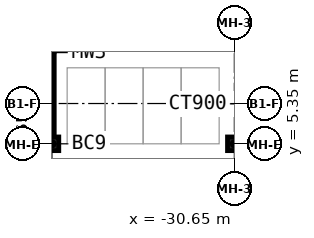
"""IFC4 building model, lengths in metres.
Left out: names, types, materials, properties, quantities, classifications, styles, units other than length and angle.
Written with IfcOpenShell. Run it as: python <this file> out.ifc"""

import sys

from ifc_helpers import new_model, si_unit, direction, frame, frame_2d, origin, origin_2d, place, context, subcontext, project, spatial, rectangle, extrude, source, transform, mapped, element, save


model = new_model("IFC4")
c1 = context("Model", 3, precision=1e-05, world=origin(), true_north=direction((0.0, 1.0)))
c2 = subcontext(c1, "Body", "Model", "MODEL_VIEW")
j1 = project(units=[si_unit("LENGTHUNIT", "METRE"), si_unit("PLANEANGLEUNIT", "RADIAN")], contexts=[c1])
p1 = place(None, origin())
s1 = spatial("IfcSite", under=j1, at=p1, CompositionType="ELEMENT")
p2 = place(p1, origin())
s2 = spatial("IfcBuilding", under=s1, at=p2, CompositionType="ELEMENT")
p3 = place(p2, frame((0.0, 0.0, -4.5)))
s3 = spatial("IfcBuildingStorey", under=s2, at=p3, CompositionType="ELEMENT", Elevation=-4.5)
m1 = source(origin(), c2, "Body", "SweptSolid", [
    extrude(rectangle(XDim=11.1, YDim=0.3, at=frame_2d((5.55, 0.0))), origin(), (0.0, 0.0, 1.0), 4.09),
])
p4 = place(p3, frame((-42.65, 5.8, 0.0), z_axis=(0.0, 0.0, 1.0), x_axis=(0.0, 1.0, 0.0)))
e1 = element("IfcWall", 1, at=p4, inside=s3, PredefinedType="SHEAR", context=c2, shape_type="MappedRepresentation", body=[
    mapped(m1, transform((0.0, 0.0, 0.0))),
])
m2 = source(origin(), c2, "Body", "SweptSolid", [
    extrude(rectangle(XDim=0.9, YDim=0.9, at=origin_2d()), origin(), (0.0, 0.0, 1.0), 4.5),
])
for number, where, z_axis, x_axis in (
    (2, (-42.65, 5.35, 0.0), (0.0, 0.0, 1.0), (1.0, 0.0, 0.0)),
    (3, (-30.65, 5.35, 0.0), (0.0, 0.0, 1.0), (1.0, 0.0, 0.0)),
):
    element("IfcColumn", number, at=place(p3, frame(where, z_axis=z_axis, x_axis=x_axis)), inside=s3, PredefinedType="COLUMN", context=c2, shape_type="MappedRepresentation", body=[
        mapped(m2, transform((0.0, 0.0, 0.0))),
    ])
save(model, sys.argv[1])
